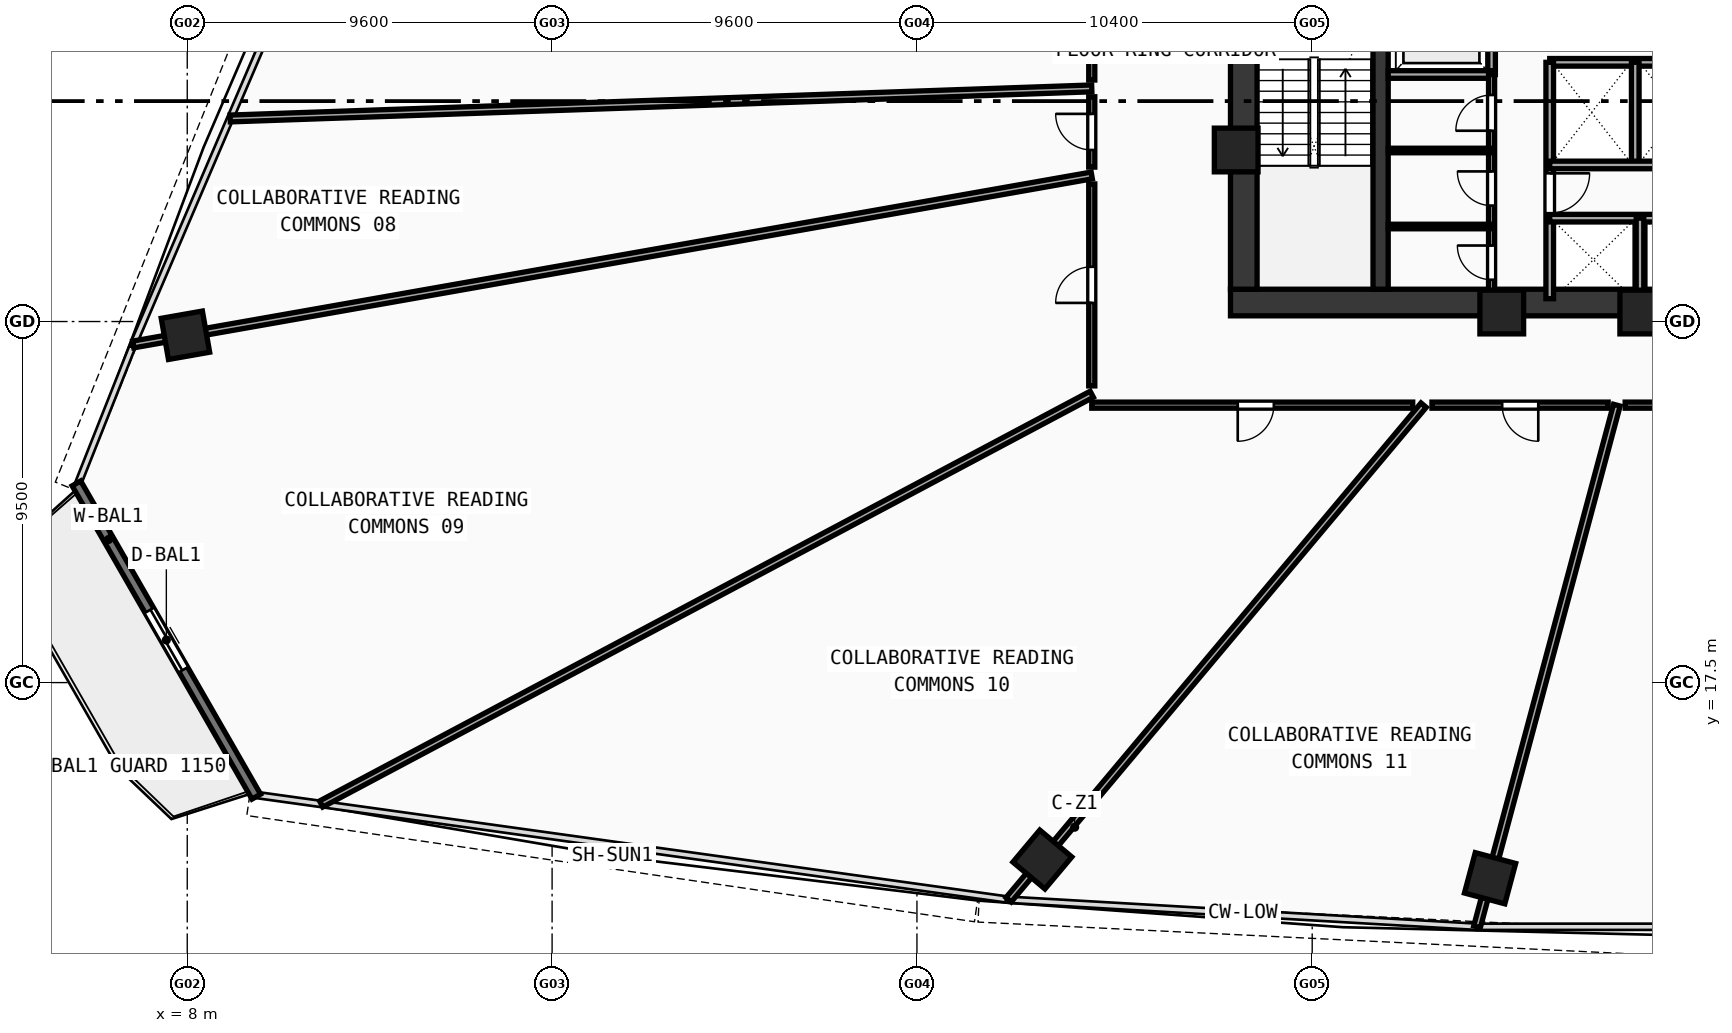
"""IFC4 building model, lengths in metres.
Left out: names, types, materials, properties, quantities, classifications, styles, units other than length and angle.
Written with IfcOpenShell. Run it as: python <this file> out.ifc"""

import sys

from ifc_helpers import new_model, si_unit, direction, frame, frame_2d, origin, origin_with_axes, origin_2d, place, context, subcontext, project, spatial, rectangle, hollow_rectangle, extrude, source, transform, mapped, element, fill, save


model = new_model("IFC4")
c1 = context("Model", 3, precision=1e-05, world=origin(), true_north=direction((0.0, 1.0)))
c2 = subcontext(c1, "Body", "Model", "MODEL_VIEW")
j1 = project(units=[si_unit("LENGTHUNIT", "METRE"), si_unit("PLANEANGLEUNIT", "RADIAN")], contexts=[c1])
p1 = place(None, origin())
s1 = spatial("IfcSite", under=j1, at=p1, CompositionType="ELEMENT")
p2 = place(p1, origin())
s2 = spatial("IfcBuilding", under=s1, at=p2, CompositionType="ELEMENT")
p3 = place(p2, frame((0.0, 0.0, 52.18)))
s3 = spatial("IfcBuildingStorey", under=s2, at=p3, CompositionType="ELEMENT", Elevation=52.18)
p4 = place(p3, frame((35.45, 27.5, 0.0), z_axis=(0.0, 0.0, 1.0), x_axis=(1.0, 0.0, 0.0)))
e1 = element("IfcWall", 1, at=p4, inside=s3, PredefinedType="SHEAR", context=c2, shape_type="SweptSolid", body=[
    extrude(rectangle(XDim=25.1, YDim=0.7, at=frame_2d((12.55, 0.0))), origin(), (0.0, 0.0, 1.0), 3.37),
])
p5 = place(p3, frame((35.8, 27.85, 0.0), z_axis=(0.0, 0.0, 1.0), x_axis=(0.0, 1.0, 0.0)))
e2 = element("IfcWall", 2, at=p5, inside=s3, PredefinedType="SHEAR", context=c2, shape_type="SweptSolid", body=[
    extrude(rectangle(XDim=12.0, YDim=0.7, at=frame_2d((6.0, 0.0))), origin(), (0.0, 0.0, 1.0), 3.37),
])
p6 = place(p3, frame((39.4, 27.85, 0.0), z_axis=(0.0, 0.0, 1.0), x_axis=(0.0, 1.0, 0.0)))
e3 = element("IfcWall", 3, at=p6, inside=s3, PredefinedType="SHEAR", context=c2, shape_type="SweptSolid", body=[
    extrude(rectangle(XDim=12.0, YDim=0.4, at=frame_2d((6.0, 0.0))), origin(), (0.0, 0.0, 1.0), 3.37),
])
p7 = place(p6, frame((9.9, 0.0, 0.0)))
e4 = element("IfcOpeningElement", 4, at=p7, cuts=e3, PredefinedType="OPENING", context=c2, shape_type="SweptSolid", body=[
    extrude(rectangle(XDim=1.1, YDim=2.1, at=frame_2d((0.55, 1.05))), frame((0.0, 0.21, 0.0), z_axis=(0.0, -1.0, 0.0), x_axis=(1.0, 0.0, 0.0)), (0.0, 0.0, 1.0), 0.42),
])
m1 = source(origin(), c2, "Body", "SweptSolid", [
    extrude(hollow_rectangle(XDim=1.15, YDim=1.15, WallThickness=0.048, at=origin_2d()), origin(), (0.0, 0.0, 1.0), 3.63),
])
for number, where, z_axis, x_axis in (
    (5, (42.588, 27.25, -0.26), (0.0, 0.0, 1.0), (1.0, 0.0, 0.0)),
    (6, (46.272, 27.25, -0.26), (0.0, 0.0, 1.0), (1.0, 0.0, 0.0)),
    (7, (35.6, 31.513, -0.26), (0.0, 0.0, 1.0), (1.0, 0.0, 0.0)),
):
    element("IfcColumn", number, at=place(p3, frame(where, z_axis=z_axis, x_axis=x_axis)), inside=s3, PredefinedType="COLUMN", context=c2, shape_type="MappedRepresentation", body=[
        mapped(m1, transform((0.0, 0.0, 0.0), scale=1.0)),
    ])
m2 = source(origin(), c2, "Body", "SweptSolid", [
    extrude(hollow_rectangle(XDim=1.1, YDim=1.1, WallThickness=0.045, at=origin_2d()), origin(), (0.0, 0.0, 1.0), 3.63),
])
for number, where, z_axis, x_axis in (
    (8, (30.5, 12.844, -0.26), (0.0, 0.0, 1.0), (0.766, -0.643, 0.0)),
    (9, (42.28, 12.352, -0.26), (0.0, 0.0, 1.0), (0.966, -0.259, 0.0)),
    (10, (7.952, 26.638, -0.26), (0.0, 0.0, 1.0), (0.174, -0.985, 0.0)),
):
    element("IfcColumn", number, at=place(p3, frame(where, z_axis=z_axis, x_axis=x_axis)), inside=s3, PredefinedType="COLUMN", context=c2, shape_type="MappedRepresentation", body=[
        mapped(m2, transform((0.0, 0.0, 0.0), scale=1.0)),
    ])
p8 = place(p3, frame((5.084, 22.741, 0.0), z_axis=(0.0, 0.0, 1.0), x_axis=(0.497919395469, -0.86722331358, 0.0)))
e11 = element("IfcWall", 11, at=p8, inside=s3, PredefinedType="STANDARD", context=c2, shape_type="SweptSolid", body=[
    extrude(rectangle(XDim=9.504, YDim=0.26, at=frame_2d((4.752, 0.0))), origin(), (0.0, 0.0, 1.0), 3.37),
])
p9 = place(p8, frame((3.852, 0.0, 0.0)))
e12 = element("IfcOpeningElement", 12, at=p9, cuts=e11, PredefinedType="OPENING", context=c2, shape_type="SweptSolid", body=[
    extrude(rectangle(XDim=1.8, YDim=2.15, at=frame_2d((0.9, 1.075))), frame((0.0, 0.14, 0.0), z_axis=(0.0, -1.0, 0.0), x_axis=(1.0, 0.0, 0.0)), (0.0, 0.0, 1.0), 0.28),
])
p10 = place(p3, frame((42.32, 33.5, 0.0), z_axis=(0.0, 0.0, 1.0), x_axis=(0.0, 1.0, 0.0)))
e13 = element("IfcWall", 13, at=p10, inside=s3, PredefinedType="SOLIDWALL", context=c2, shape_type="SweptSolid", body=[
    extrude(rectangle(XDim=6.45, YDim=0.2, at=frame_2d((3.225, 0.0))), origin(), (0.0, 0.0, 1.0), 3.37),
])
p11 = place(p10, frame((1.0, 0.0, 0.0)))
e14 = element("IfcOpeningElement", 14, at=p11, cuts=e13, PredefinedType="OPENING", context=c2, shape_type="SweptSolid", body=[
    extrude(rectangle(XDim=1.05, YDim=2.1, at=frame_2d((0.525, 1.05))), frame((0.0, 0.11, 0.0), z_axis=(0.0, -1.0, 0.0), x_axis=(1.0, 0.0, 0.0)), (0.0, 0.0, 1.0), 0.22),
])
p12 = place(p3, frame((39.6, 33.5, 0.0), z_axis=(0.0, 0.0, 1.0), x_axis=(1.0, 0.0, 0.0)))
e15 = element("IfcWall", 15, at=p12, inside=s3, PredefinedType="SOLIDWALL", context=c2, shape_type="SweptSolid", body=[
    extrude(rectangle(XDim=2.72, YDim=0.2, at=frame_2d((1.36, 0.0))), origin(), (0.0, 0.0, 1.0), 3.37),
])
p13 = place(p3, frame((43.85, 33.82, 0.0), z_axis=(0.0, 0.0, 1.0), x_axis=(1.0, 0.0, 0.0)))
e16 = element("IfcWall", 16, at=p13, inside=s3, PredefinedType="SOLIDWALL", context=c2, shape_type="SweptSolid", body=[
    extrude(rectangle(XDim=9.83, YDim=0.2, at=frame_2d((4.915, 0.0))), origin(), (0.0, 0.0, 1.0), 3.37),
])
p14 = place(p3, frame((43.85, 27.6, 0.0), z_axis=(0.0, 0.0, 1.0), x_axis=(0.0, 1.0, 0.0)))
e17 = element("IfcWall", 17, at=p14, inside=s3, PredefinedType="SOLIDWALL", context=c2, shape_type="SweptSolid", body=[
    extrude(rectangle(XDim=6.22, YDim=0.2, at=frame_2d((3.11, 0.0))), origin(), (0.0, 0.0, 1.0), 3.37),
])
p15 = place(p14, frame((2.25, 0.0, 0.0)))
e18 = element("IfcOpeningElement", 18, at=p15, cuts=e17, PredefinedType="OPENING", context=c2, shape_type="SweptSolid", body=[
    extrude(rectangle(XDim=1.05, YDim=2.1, at=frame_2d((0.525, 1.05))), frame((0.0, 0.11, 0.0), z_axis=(0.0, -1.0, 0.0), x_axis=(1.0, 0.0, 0.0)), (0.0, 0.0, 1.0), 0.22),
])
p16 = place(p3, frame((46.1, 31.12, 0.0), z_axis=(0.0, 0.0, 1.0), x_axis=(0.0, 1.0, 0.0)))
e19 = element("IfcWall", 19, at=p16, inside=s3, PredefinedType="SOLIDWALL", context=c2, shape_type="SweptSolid", body=[
    extrude(rectangle(XDim=2.7, YDim=0.2, at=frame_2d((1.35, 0.0))), origin(), (0.0, 0.0, 1.0), 3.37),
])
p17 = place(p3, frame((43.85, 29.72, 0.0), z_axis=(0.0, 0.0, 1.0), x_axis=(1.0, 0.0, 0.0)))
e20 = element("IfcWall", 20, at=p17, inside=s3, PredefinedType="SOLIDWALL", context=c2, shape_type="SweptSolid", body=[
    extrude(rectangle(XDim=7.2, YDim=0.2, at=frame_2d((3.6, 0.0))), origin(), (0.0, 0.0, 1.0), 3.37),
])
p18 = place(p3, frame((43.85, 31.12, 0.0), z_axis=(0.0, 0.0, 1.0), x_axis=(1.0, 0.0, 0.0)))
e21 = element("IfcWall", 21, at=p18, inside=s3, PredefinedType="SOLIDWALL", context=c2, shape_type="SweptSolid", body=[
    extrude(rectangle(XDim=9.83, YDim=0.2, at=frame_2d((4.915, 0.0))), origin(), (0.0, 0.0, 1.0), 3.37),
])
p19 = place(p3, frame((46.225, 27.6, 0.0), z_axis=(0.0, 0.0, 1.0), x_axis=(0.0, 1.0, 0.0)))
e22 = element("IfcWall", 22, at=p19, inside=s3, PredefinedType="SOLIDWALL", context=c2, shape_type="SweptSolid", body=[
    extrude(rectangle(XDim=2.12, YDim=0.2, at=frame_2d((1.06, 0.0))), origin(), (0.0, 0.0, 1.0), 3.37),
])
p20 = place(p3, frame((42.32, 27.6, 0.0), z_axis=(0.0, 0.0, 1.0), x_axis=(0.0, 1.0, 0.0)))
e23 = element("IfcWall", 23, at=p20, inside=s3, PredefinedType="PARTITIONING", context=c2, shape_type="SweptSolid", body=[
    extrude(rectangle(XDim=5.9, YDim=0.16, at=frame_2d((2.95, 0.0))), origin(), (0.0, 0.0, 1.0), 3.37),
])
p21 = place(p20, frame((0.5, 0.0, 0.0)))
e24 = element("IfcOpeningElement", 24, at=p21, cuts=e23, PredefinedType="OPENING", context=c2, shape_type="SweptSolid", body=[
    extrude(rectangle(XDim=0.9, YDim=2.1, at=frame_2d((0.45, 1.05))), frame((0.0, 0.09, 0.0), z_axis=(0.0, -1.0, 0.0), x_axis=(1.0, 0.0, 0.0)), (0.0, 0.0, 1.0), 0.18),
])
p22 = place(p20, frame((2.45, 0.0, 0.0)))
e25 = element("IfcOpeningElement", 25, at=p22, cuts=e23, PredefinedType="OPENING", context=c2, shape_type="SweptSolid", body=[
    extrude(rectangle(XDim=0.9, YDim=2.1, at=frame_2d((0.45, 1.05))), frame((0.0, 0.09, 0.0), z_axis=(0.0, -1.0, 0.0), x_axis=(1.0, 0.0, 0.0)), (0.0, 0.0, 1.0), 0.18),
])
p23 = place(p20, frame((4.42, 0.0, 0.0)))
e26 = element("IfcOpeningElement", 26, at=p23, cuts=e23, PredefinedType="OPENING", context=c2, shape_type="SweptSolid", body=[
    extrude(rectangle(XDim=0.94, YDim=2.1, at=frame_2d((0.47, 1.05))), frame((0.0, 0.09, 0.0), z_axis=(0.0, -1.0, 0.0), x_axis=(1.0, 0.0, 0.0)), (0.0, 0.0, 1.0), 0.18),
])
for number, where, z_axis, x_axis in (
    (27, (39.6, 29.5, 0.0), (0.0, 0.0, 1.0), (1.0, 0.0, 0.0)),
    (28, (39.6, 31.5, 0.0), (0.0, 0.0, 1.0), (1.0, 0.0, 0.0)),
):
    element("IfcWall", number, at=place(p3, frame(where, z_axis=z_axis, x_axis=x_axis)), inside=s3, PredefinedType="PARTITIONING", context=c2, shape_type="SweptSolid", body=[
        extrude(rectangle(XDim=2.72, YDim=0.12, at=frame_2d((1.36, 0.0))), origin(), (0.0, 0.0, 1.0), 3.37),
    ])
p24 = place(p3, frame((31.8, 33.134, 0.0), z_axis=(0.0, 0.0, 1.0), x_axis=(-0.999390651746, -0.034904515515, 0.0)))
e29 = element("IfcWall", 29, at=p24, inside=s3, PredefinedType="PARTITIONING", context=c2, shape_type="SweptSolid", body=[
    extrude(rectangle(XDim=22.683, YDim=0.18, at=frame_2d((11.342, 0.0))), origin(), (0.0, 0.0, 1.0), 2.67),
])
p25 = place(p3, frame((31.8, 30.844, 0.0), z_axis=(0.0, 0.0, 1.0), x_axis=(-0.984808213418, -0.173645566555, 0.0)))
e30 = element("IfcWall", 30, at=p25, inside=s3, PredefinedType="PARTITIONING", context=c2, shape_type="SweptSolid", body=[
    extrude(rectangle(XDim=25.61, YDim=0.18, at=frame_2d((12.805, 0.0))), origin(), (0.0, 0.0, 1.0), 2.67),
])
p26 = place(p3, frame((31.8, 25.086, 0.0), z_axis=(0.0, 0.0, 1.0), x_axis=(-0.882952279159, -0.469462749032, 0.0)))
e31 = element("IfcWall", 31, at=p26, inside=s3, PredefinedType="PARTITIONING", context=c2, shape_type="SweptSolid", body=[
    extrude(rectangle(XDim=22.965, YDim=0.18, at=frame_2d((11.482, 0.0))), origin(), (0.0, 0.0, 1.0), 2.67),
])
p27 = place(p3, frame((40.532, 24.8, 0.0), z_axis=(0.0, 0.0, 1.0), x_axis=(-0.642791593325, -0.766041100432, 0.0)))
e32 = element("IfcWall", 32, at=p27, inside=s3, PredefinedType="PARTITIONING", context=c2, shape_type="SweptSolid", body=[
    extrude(rectangle(XDim=16.988, YDim=0.18, at=frame_2d((8.494, 0.0))), origin(), (0.0, 0.0, 1.0), 2.67),
])
p28 = place(p3, frame((45.615, 24.8, 0.0), z_axis=(0.0, 0.0, 1.0), x_axis=(-0.258821679731, -0.965925120339, 0.0)))
e33 = element("IfcWall", 33, at=p28, inside=s3, PredefinedType="PARTITIONING", context=c2, shape_type="SweptSolid", body=[
    extrude(rectangle(XDim=14.209, YDim=0.18, at=frame_2d((7.105, 0.0))), origin(), (0.0, 0.0, 1.0), 2.67),
])
p29 = place(p3, frame((31.8, 25.306, 0.0), z_axis=(0.0, 0.0, 1.0), x_axis=(0.0, 1.0, 0.0)))
e34 = element("IfcWall", 34, at=p29, inside=s3, PredefinedType="PARTITIONING", context=c2, shape_type="SweptSolid", body=[
    extrude(rectangle(XDim=5.314, YDim=0.16, at=frame_2d((2.657, 0.0))), origin(), (0.0, 0.0, 1.0), 2.97),
])
p30 = place(p29, frame((2.184, 0.0, 0.0)))
e35 = element("IfcOpeningElement", 35, at=p30, cuts=e34, PredefinedType="OPENING", context=c2, shape_type="SweptSolid", body=[
    extrude(rectangle(XDim=0.95, YDim=2.1, at=frame_2d((0.475, 1.05))), frame((0.0, 0.09, 0.0), z_axis=(0.0, -1.0, 0.0), x_axis=(1.0, 0.0, 0.0)), (0.0, 0.0, 1.0), 0.18),
])
p31 = place(p3, frame((31.8, 31.063, 0.0), z_axis=(0.0, 0.0, 1.0), x_axis=(0.0, 1.0, 0.0)))
e36 = element("IfcWall", 36, at=p31, inside=s3, PredefinedType="PARTITIONING", context=c2, shape_type="SweptSolid", body=[
    extrude(rectangle(XDim=1.851, YDim=0.16, at=frame_2d((0.926, 0.0))), origin(), (0.0, 0.0, 1.0), 3.37),
])
p32 = place(p31, frame((0.451, 0.0, 0.0)))
e37 = element("IfcOpeningElement", 37, at=p32, cuts=e36, PredefinedType="OPENING", context=c2, shape_type="SweptSolid", body=[
    extrude(rectangle(XDim=0.95, YDim=2.1, at=frame_2d((0.475, 1.05))), frame((0.0, 0.09, 0.0), z_axis=(0.0, -1.0, 0.0), x_axis=(1.0, 0.0, 0.0)), (0.0, 0.0, 1.0), 0.18),
])
p33 = place(p3, frame((31.8, 33.354, 0.0), z_axis=(0.0, 0.0, 1.0), x_axis=(0.0, 1.0, 0.0)))
e38 = element("IfcWall", 38, at=p33, inside=s3, PredefinedType="PARTITIONING", context=c2, shape_type="SweptSolid", body=[
    extrude(rectangle(XDim=5.39, YDim=0.16, at=frame_2d((2.695, 0.0))), origin(), (0.0, 0.0, 1.0), 3.37),
])
p34 = place(p33, frame((2.22, 0.0, 0.0)))
e39 = element("IfcOpeningElement", 39, at=p34, cuts=e38, PredefinedType="OPENING", context=c2, shape_type="SweptSolid", body=[
    extrude(rectangle(XDim=0.95, YDim=2.1, at=frame_2d((0.475, 1.05))), frame((0.0, 0.09, 0.0), z_axis=(0.0, -1.0, 0.0), x_axis=(1.0, 0.0, 0.0)), (0.0, 0.0, 1.0), 0.18),
])
p35 = place(p3, frame((55.248, 24.8, 0.0), z_axis=(0.0, 0.0, 1.0), x_axis=(-1.0, 0.0, 0.0)))
e40 = element("IfcWall", 40, at=p35, inside=s3, PredefinedType="PARTITIONING", context=c2, shape_type="SweptSolid", body=[
    extrude(rectangle(XDim=9.413, YDim=0.16, at=frame_2d((4.707, 0.0))), origin(), (0.0, 0.0, 1.0), 2.67),
])
p36 = place(p35, frame((4.231, 0.0, 0.0)))
e41 = element("IfcOpeningElement", 41, at=p36, cuts=e40, PredefinedType="OPENING", context=c2, shape_type="SweptSolid", body=[
    extrude(rectangle(XDim=0.95, YDim=2.1, at=frame_2d((0.475, 1.05))), frame((0.0, 0.09, 0.0), z_axis=(0.0, -1.0, 0.0), x_axis=(1.0, 0.0, 0.0)), (0.0, 0.0, 1.0), 0.18),
])
p37 = place(p3, frame((45.387, 24.8, 0.0), z_axis=(0.0, 0.0, 1.0), x_axis=(-1.0, 0.0, 0.0)))
e42 = element("IfcWall", 42, at=p37, inside=s3, PredefinedType="PARTITIONING", context=c2, shape_type="SweptSolid", body=[
    extrude(rectangle(XDim=4.635, YDim=0.16, at=frame_2d((2.318, 0.0))), origin(), (0.0, 0.0, 1.0), 2.67),
])
p38 = place(p37, frame((1.839, 0.0, 0.0)))
e43 = element("IfcOpeningElement", 43, at=p38, cuts=e42, PredefinedType="OPENING", context=c2, shape_type="SweptSolid", body=[
    extrude(rectangle(XDim=0.95, YDim=2.1, at=frame_2d((0.475, 1.05))), frame((0.0, 0.09, 0.0), z_axis=(0.0, -1.0, 0.0), x_axis=(1.0, 0.0, 0.0)), (0.0, 0.0, 1.0), 0.18),
])
p39 = place(p3, frame((40.245, 24.8, 0.0), z_axis=(0.0, 0.0, 1.0), x_axis=(-1.0, 0.0, 0.0)))
e44 = element("IfcWall", 44, at=p39, inside=s3, PredefinedType="PARTITIONING", context=c2, shape_type="SweptSolid", body=[
    extrude(rectangle(XDim=8.445, YDim=0.16, at=frame_2d((4.222, 0.0))), origin(), (0.0, 0.0, 1.0), 2.97),
])
p40 = place(p39, frame((3.654, 0.0, 0.0)))
e45 = element("IfcOpeningElement", 45, at=p40, cuts=e44, PredefinedType="OPENING", context=c2, shape_type="SweptSolid", body=[
    extrude(rectangle(XDim=0.95, YDim=2.1, at=frame_2d((0.475, 1.05))), frame((0.0, 0.09, 0.0), z_axis=(0.0, -1.0, 0.0), x_axis=(1.0, 0.0, 0.0)), (0.0, 0.0, 1.0), 0.18),
])
m3 = source(origin(), c2, "Body", "SweptSolid", [
    extrude(rectangle(XDim=1.8, YDim=2.15, at=frame_2d((0.9, 1.075))), frame((0.0, 0.025, 0.0), z_axis=(0.0, -1.0, 0.0), x_axis=(1.0, 0.0, 0.0)), (0.0, 0.0, 1.0), 0.05),
])
p41 = place(p9, origin_with_axes())
e46 = element("IfcDoor", 46, at=p41, inside=s3, OperationType="DOUBLE_DOOR_SLIDING", PredefinedType="DOOR", context=c2, shape_type="MappedRepresentation", body=[
    mapped(m3, transform((0.0, 0.0, 0.0), scale=1.0)),
])
fill(e12, e46)
m4 = source(origin(), c2, "Body", "SweptSolid", [
    extrude(rectangle(XDim=1.05, YDim=2.1, at=frame_2d((0.525, 1.05))), frame((0.0, 0.025, 0.0), z_axis=(0.0, -1.0, 0.0), x_axis=(1.0, 0.0, 0.0)), (0.0, 0.0, 1.0), 0.05),
])
p42 = place(p15, frame((1.05, 0.0, 0.0), z_axis=(0.0, 0.0, 1.0), x_axis=(-1.0, 0.0, 0.0)))
e47 = element("IfcDoor", 47, at=p42, inside=s3, OperationType="SINGLE_SWING_LEFT", PredefinedType="DOOR", context=c2, shape_type="MappedRepresentation", body=[
    mapped(m4, transform((0.0, 0.0, 0.0), scale=1.0)),
])
fill(e18, e47)
m5 = source(origin(), c2, "Body", "SweptSolid", [
    extrude(rectangle(XDim=0.9, YDim=2.1, at=frame_2d((0.45, 1.05))), frame((0.0, 0.025, 0.0), z_axis=(0.0, -1.0, 0.0), x_axis=(1.0, 0.0, 0.0)), (0.0, 0.0, 1.0), 0.05),
])
p43 = place(p21, origin_with_axes())
e48 = element("IfcDoor", 48, at=p43, inside=s3, OperationType="SINGLE_SWING_RIGHT", PredefinedType="DOOR", context=c2, shape_type="MappedRepresentation", body=[
    mapped(m5, transform((0.0, 0.0, 0.0), scale=1.0)),
])
fill(e24, e48)
p44 = place(p22, origin_with_axes())
e49 = element("IfcDoor", 49, at=p44, inside=s3, OperationType="SINGLE_SWING_RIGHT", PredefinedType="DOOR", context=c2, shape_type="MappedRepresentation", body=[
    mapped(m5, transform((0.0, 0.0, 0.0), scale=1.0)),
])
fill(e25, e49)
m6 = source(origin(), c2, "Body", "SweptSolid", [
    extrude(rectangle(XDim=0.94, YDim=2.1, at=frame_2d((0.47, 1.05))), frame((0.0, 0.025, 0.0), z_axis=(0.0, -1.0, 0.0), x_axis=(1.0, 0.0, 0.0)), (0.0, 0.0, 1.0), 0.05),
])
p45 = place(p23, origin_with_axes())
e50 = element("IfcDoor", 50, at=p45, inside=s3, OperationType="SINGLE_SWING_LEFT", PredefinedType="DOOR", context=c2, shape_type="MappedRepresentation", body=[
    mapped(m6, transform((0.0, 0.0, 0.0), scale=1.0)),
])
fill(e26, e50)
m7 = source(origin(), c2, "Body", "SweptSolid", [
    extrude(rectangle(XDim=0.95, YDim=2.1, at=frame_2d((0.475, 1.05))), frame((0.0, 0.025, 0.0), z_axis=(0.0, -1.0, 0.0), x_axis=(1.0, 0.0, 0.0)), (0.0, 0.0, 1.0), 0.05),
])
p46 = place(p32, origin_with_axes())
e51 = element("IfcDoor", 51, at=p46, inside=s3, OperationType="SINGLE_SWING_RIGHT", PredefinedType="DOOR", context=c2, shape_type="MappedRepresentation", body=[
    mapped(m7, transform((0.0, 0.0, 0.0), scale=1.0)),
])
fill(e37, e51)
p47 = place(p30, origin_with_axes())
e52 = element("IfcDoor", 52, at=p47, inside=s3, OperationType="SINGLE_SWING_LEFT", PredefinedType="DOOR", context=c2, shape_type="MappedRepresentation", body=[
    mapped(m7, transform((0.0, 0.0, 0.0), scale=1.0)),
])
fill(e35, e52)
p48 = place(p40, origin_with_axes())
e53 = element("IfcDoor", 53, at=p48, inside=s3, OperationType="SINGLE_SWING_RIGHT", PredefinedType="DOOR", context=c2, shape_type="MappedRepresentation", body=[
    mapped(m7, transform((0.0, 0.0, 0.0), scale=1.0)),
])
fill(e45, e53)
p49 = place(p38, origin_with_axes())
e54 = element("IfcDoor", 54, at=p49, inside=s3, OperationType="SINGLE_SWING_LEFT", PredefinedType="DOOR", context=c2, shape_type="MappedRepresentation", body=[
    mapped(m7, transform((0.0, 0.0, 0.0), scale=1.0)),
])
fill(e43, e54)
save(model, sys.argv[1])
